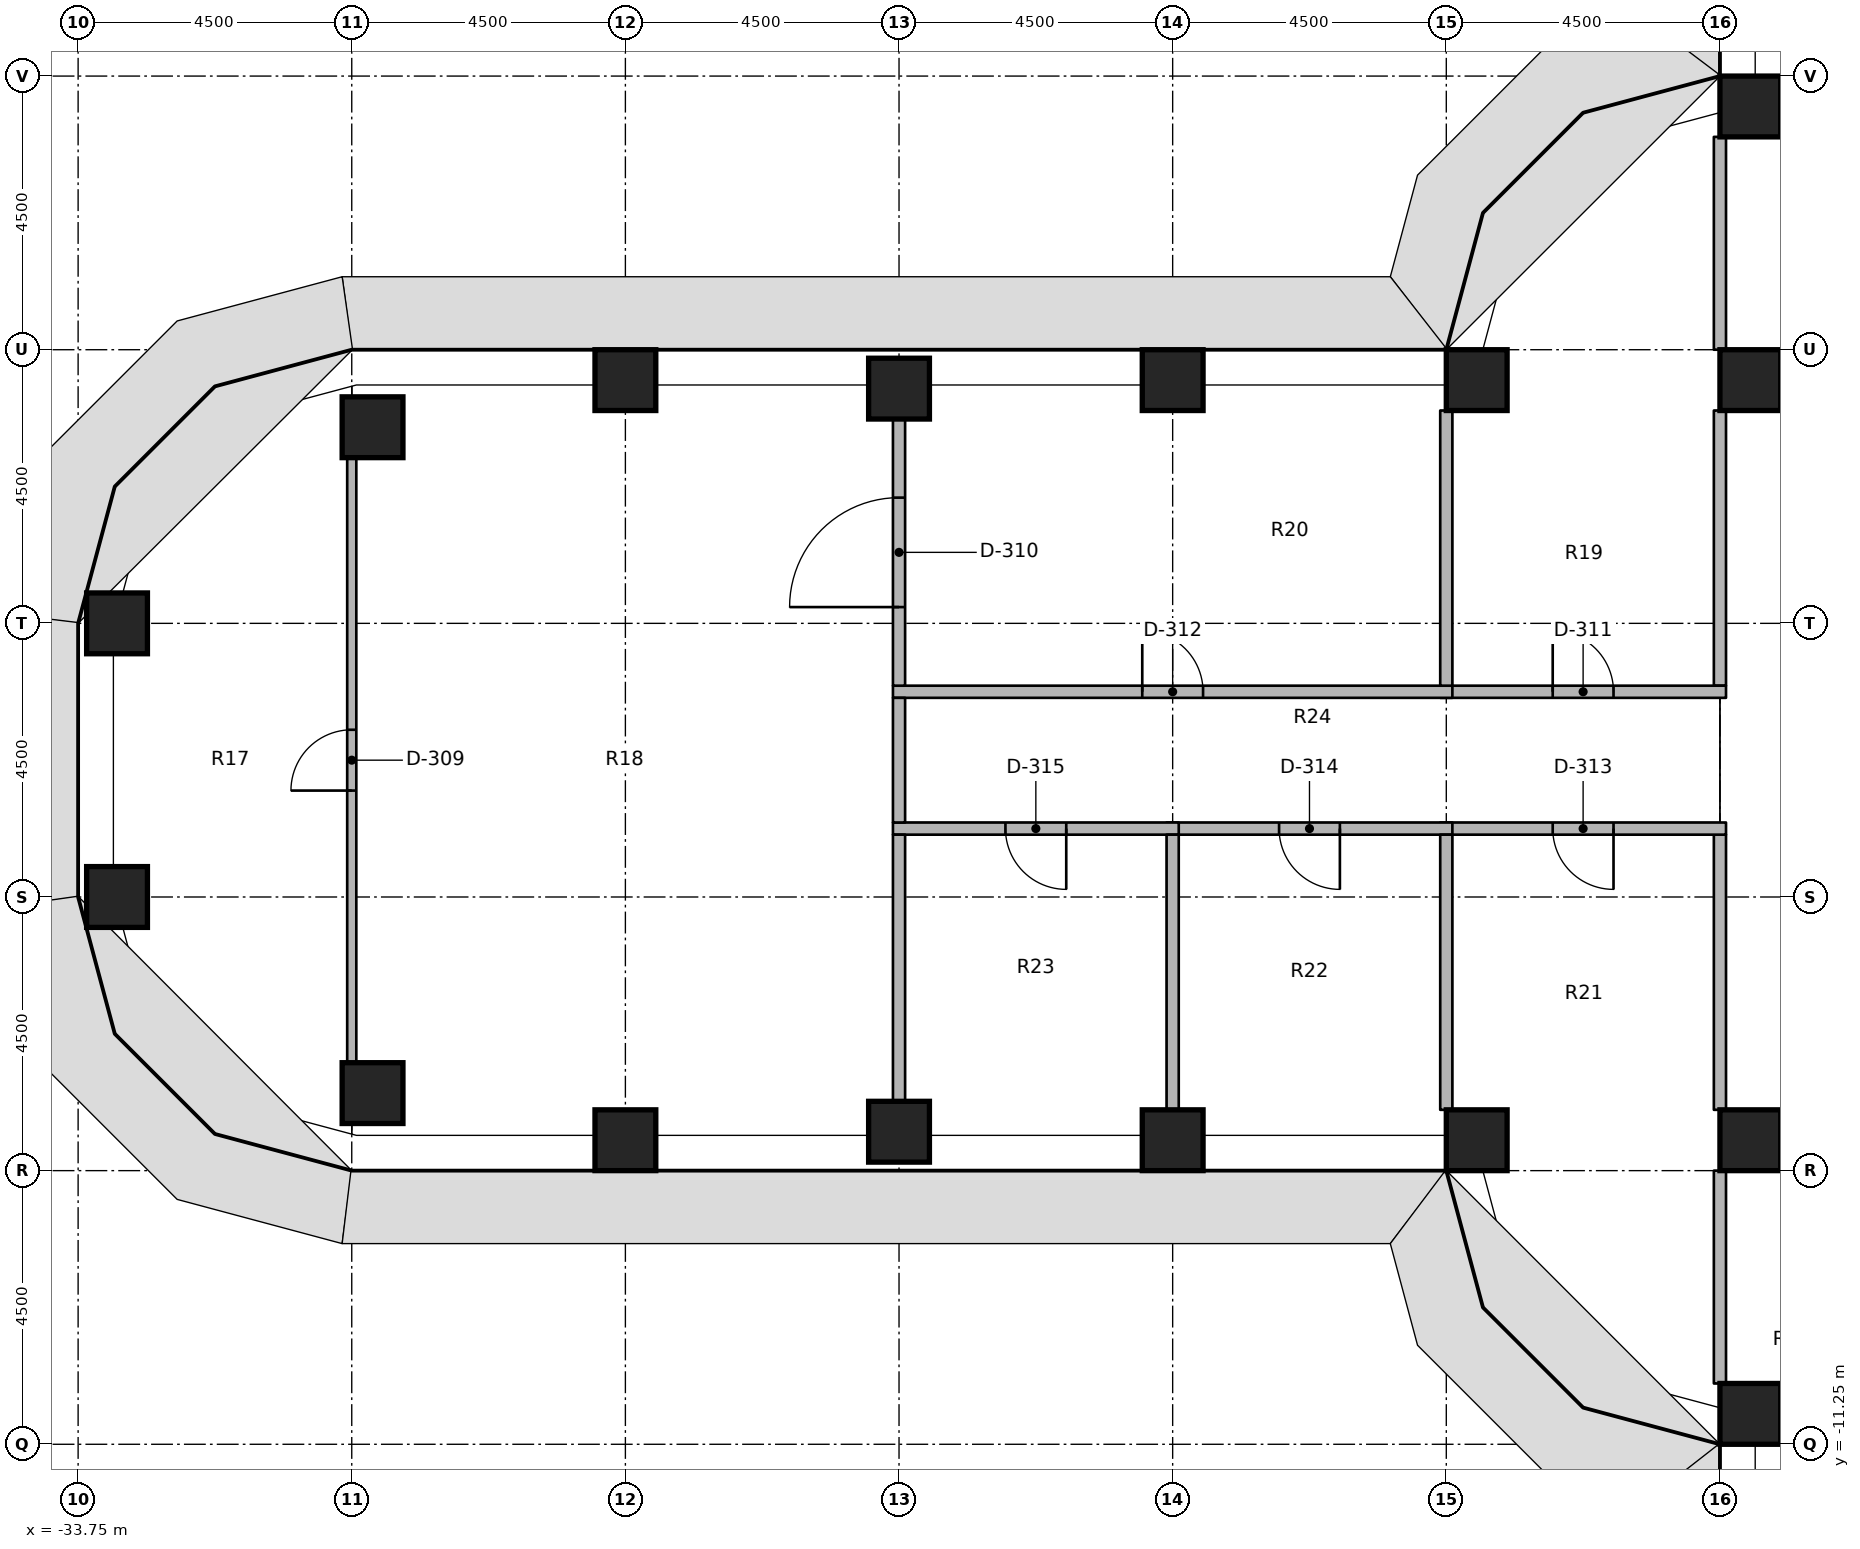
"""IFC4 building model, lengths in metres.
Left out: names, types, materials, properties, quantities, classifications, styles, units other than length and angle.
Written with IfcOpenShell. Run it as: python <this file> out.ifc"""

import sys

from ifc_helpers import new_model, si_unit, direction, frame, frame_2d, origin, origin_2d, place, context, subcontext, project, spatial, rectangle, extrude, element, fill, save


model = new_model("IFC4")
c1 = context("Model", 3, precision=1e-05, world=origin(), true_north=direction((0.0, 1.0)))
c2 = subcontext(c1, "Body", "Model", "MODEL_VIEW")
j1 = project(units=[si_unit("LENGTHUNIT", "METRE"), si_unit("PLANEANGLEUNIT", "RADIAN")], contexts=[c1])
p1 = place(None, origin())
s1 = spatial("IfcSite", under=j1, at=p1, CompositionType="ELEMENT")
p2 = place(p1, origin())
s2 = spatial("IfcBuilding", under=s1, at=p2, CompositionType="ELEMENT")
p3 = place(p2, frame((0.0, 0.0, 43.8)))
s3 = spatial("IfcBuildingStorey", under=s2, at=p3, CompositionType="ELEMENT", Elevation=43.8)
for number, where, z_axis, x_axis in (
    (1, (-33.11, -2.25, 0.0), (0.0, 0.0, 1.0), (1.0, 0.0, 0.0)),
    (2, (-33.11, 2.25, 0.0), (0.0, 0.0, 1.0), (1.0, 0.0, 0.0)),
    (3, (-28.908, -5.475, 0.0), (0.0, 0.0, 1.0), (1.0, 0.0, 0.0)),
    (4, (-28.908, 5.475, 0.0), (0.0, 0.0, 1.0), (1.0, 0.0, 0.0)),
    (5, (-24.75, -6.25, 0.0), (0.0, 0.0, 1.0), (1.0, 0.0, 0.0)),
    (6, (-24.75, 6.25, 0.0), (0.0, 0.0, 1.0), (1.0, 0.0, 0.0)),
    (7, (-20.25, -6.11, 0.0), (0.0, 0.0, 1.0), (1.0, 0.0, 0.0)),
    (8, (-20.25, 6.11, 0.0), (0.0, 0.0, 1.0), (1.0, 0.0, 0.0)),
    (9, (-15.75, -6.25, 0.0), (0.0, 0.0, 1.0), (1.0, 0.0, 0.0)),
    (10, (-15.75, 6.25, 0.0), (0.0, 0.0, 1.0), (1.0, 0.0, 0.0)),
    (11, (-10.75, -6.25, 0.0), (0.0, 0.0, 1.0), (1.0, 0.0, 0.0)),
    (12, (-10.75, 6.25, 0.0), (0.0, 0.0, 1.0), (1.0, 0.0, 0.0)),
    (13, (-6.25, -10.75, 0.0), (0.0, 0.0, 1.0), (1.0, 0.0, 0.0)),
    (14, (-6.25, -6.25, 0.0), (0.0, 0.0, 1.0), (1.0, 0.0, 0.0)),
    (15, (-6.25, 6.25, 0.0), (0.0, 0.0, 1.0), (1.0, 0.0, 0.0)),
    (16, (-6.25, 10.75, 0.0), (0.0, 0.0, 1.0), (1.0, 0.0, 0.0)),
):
    element("IfcColumn", number, at=place(p3, frame(where, z_axis=z_axis, x_axis=x_axis)), inside=s3, PredefinedType="COLUMN", context=c2, shape_type="SweptSolid", body=[
        extrude(rectangle(XDim=1.0, YDim=1.0, at=origin_2d()), origin(), (0.0, 0.0, 1.0), 4.05),
    ])
p4 = place(p3, frame((-6.75, 1.225, 0.0), z_axis=(0.0, 0.0, 1.0), x_axis=(0.0, 1.0, 0.0)))
e17 = element("IfcWall", 17, at=p4, inside=s3, PredefinedType="PARTITIONING", context=c2, shape_type="SweptSolid", body=[
    extrude(rectangle(XDim=4.525, YDim=0.2, at=frame_2d((2.262, 0.0))), origin(), (0.0, 0.0, 1.0), 3.13),
])
for number, where, z_axis, x_axis in (
    (18, (-6.75, 6.75, 0.0), (0.0, 0.0, 1.0), (0.0, 1.0, 0.0)),
    (19, (-6.75, -10.25, 0.0), (0.0, 0.0, 1.0), (0.0, 1.0, 0.0)),
):
    element("IfcWall", number, at=place(p3, frame(where, z_axis=z_axis, x_axis=x_axis)), inside=s3, PredefinedType="PARTITIONING", context=c2, shape_type="SweptSolid", body=[
        extrude(rectangle(XDim=3.5, YDim=0.2, at=frame_2d((1.75, 0.0))), origin(), (0.0, 0.0, 1.0), 3.13),
    ])
p5 = place(p3, frame((-6.75, -5.75, 0.0), z_axis=(0.0, 0.0, 1.0), x_axis=(0.0, 1.0, 0.0)))
e20 = element("IfcWall", 20, at=p5, inside=s3, PredefinedType="PARTITIONING", context=c2, shape_type="SweptSolid", body=[
    extrude(rectangle(XDim=4.525, YDim=0.2, at=frame_2d((2.262, 0.0))), origin(), (0.0, 0.0, 1.0), 3.13),
])
p6 = place(p3, frame((-11.35, 1.125, 0.0), z_axis=(0.0, 0.0, 1.0), x_axis=(1.0, 0.0, 0.0)))
e21 = element("IfcWall", 21, at=p6, inside=s3, PredefinedType="PARTITIONING", context=c2, shape_type="SweptSolid", body=[
    extrude(rectangle(XDim=4.7, YDim=0.2, at=frame_2d((2.35, 0.0))), origin(), (0.0, 0.0, 1.0), 3.13),
])
p7 = place(p6, frame((1.85, 0.0, 0.0)))
e22 = element("IfcOpeningElement", 22, at=p7, cuts=e21, PredefinedType="OPENING", context=c2, shape_type="SweptSolid", body=[
    extrude(rectangle(XDim=1.0, YDim=2.1, at=frame_2d((0.5, 1.05))), frame((0.0, 0.11, 0.0), z_axis=(0.0, -1.0, 0.0), x_axis=(1.0, 0.0, 0.0)), (0.0, 0.0, 1.0), 0.22),
])
p8 = place(p3, frame((-6.65, -1.125, 0.0), z_axis=(0.0, 0.0, 1.0), x_axis=(-1.0, 0.0, 0.0)))
e23 = element("IfcWall", 23, at=p8, inside=s3, PredefinedType="PARTITIONING", context=c2, shape_type="SweptSolid", body=[
    extrude(rectangle(XDim=4.7, YDim=0.2, at=frame_2d((2.35, 0.0))), origin(), (0.0, 0.0, 1.0), 3.13),
])
p9 = place(p8, frame((1.85, 0.0, 0.0)))
e24 = element("IfcOpeningElement", 24, at=p9, cuts=e23, PredefinedType="OPENING", context=c2, shape_type="SweptSolid", body=[
    extrude(rectangle(XDim=1.0, YDim=2.1, at=frame_2d((0.5, 1.05))), frame((0.0, 0.11, 0.0), z_axis=(0.0, -1.0, 0.0), x_axis=(1.0, 0.0, 0.0)), (0.0, 0.0, 1.0), 0.22),
])
p10 = place(p3, frame((-20.35, 1.125, 0.0), z_axis=(0.0, 0.0, 1.0), x_axis=(1.0, 0.0, 0.0)))
e25 = element("IfcWall", 25, at=p10, inside=s3, PredefinedType="PARTITIONING", context=c2, shape_type="SweptSolid", body=[
    extrude(rectangle(XDim=9.2, YDim=0.2, at=frame_2d((4.6, 0.0))), origin(), (0.0, 0.0, 1.0), 3.13),
])
p11 = place(p10, frame((4.1, 0.0, 0.0)))
e26 = element("IfcOpeningElement", 26, at=p11, cuts=e25, PredefinedType="OPENING", context=c2, shape_type="SweptSolid", body=[
    extrude(rectangle(XDim=1.0, YDim=2.1, at=frame_2d((0.5, 1.05))), frame((0.0, 0.11, 0.0), z_axis=(0.0, -1.0, 0.0), x_axis=(1.0, 0.0, 0.0)), (0.0, 0.0, 1.0), 0.22),
])
p12 = place(p3, frame((-11.15, -1.125, 0.0), z_axis=(0.0, 0.0, 1.0), x_axis=(-1.0, 0.0, 0.0)))
e27 = element("IfcWall", 27, at=p12, inside=s3, PredefinedType="PARTITIONING", context=c2, shape_type="SweptSolid", body=[
    extrude(rectangle(XDim=4.7, YDim=0.2, at=frame_2d((2.35, 0.0))), origin(), (0.0, 0.0, 1.0), 3.13),
])
p13 = place(p12, frame((1.85, 0.0, 0.0)))
e28 = element("IfcOpeningElement", 28, at=p13, cuts=e27, PredefinedType="OPENING", context=c2, shape_type="SweptSolid", body=[
    extrude(rectangle(XDim=1.0, YDim=2.1, at=frame_2d((0.5, 1.05))), frame((0.0, 0.11, 0.0), z_axis=(0.0, -1.0, 0.0), x_axis=(1.0, 0.0, 0.0)), (0.0, 0.0, 1.0), 0.22),
])
p14 = place(p3, frame((-15.65, -1.125, 0.0), z_axis=(0.0, 0.0, 1.0), x_axis=(-1.0, 0.0, 0.0)))
e29 = element("IfcWall", 29, at=p14, inside=s3, PredefinedType="PARTITIONING", context=c2, shape_type="SweptSolid", body=[
    extrude(rectangle(XDim=4.7, YDim=0.2, at=frame_2d((2.35, 0.0))), origin(), (0.0, 0.0, 1.0), 3.13),
])
p15 = place(p14, frame((1.85, 0.0, 0.0)))
e30 = element("IfcOpeningElement", 30, at=p15, cuts=e29, PredefinedType="OPENING", context=c2, shape_type="SweptSolid", body=[
    extrude(rectangle(XDim=1.0, YDim=2.1, at=frame_2d((0.5, 1.05))), frame((0.0, 0.11, 0.0), z_axis=(0.0, -1.0, 0.0), x_axis=(1.0, 0.0, 0.0)), (0.0, 0.0, 1.0), 0.22),
])
p16 = place(p3, frame((-20.25, -1.025, 0.0), z_axis=(0.0, 0.0, 1.0), x_axis=(0.0, 1.0, 0.0)))
e31 = element("IfcWall", 31, at=p16, inside=s3, PredefinedType="PARTITIONING", context=c2, shape_type="SweptSolid", body=[
    extrude(rectangle(XDim=2.05, YDim=0.2, at=frame_2d((1.025, 0.0))), origin(), (0.0, 0.0, 1.0), 3.13),
])
for number, where, z_axis, x_axis in (
    (32, (-11.25, 1.225, 0.0), (0.0, 0.0, 1.0), (0.0, 1.0, 0.0)),
    (33, (-11.25, -5.75, 0.0), (0.0, 0.0, 1.0), (0.0, 1.0, 0.0)),
):
    element("IfcWall", number, at=place(p3, frame(where, z_axis=z_axis, x_axis=x_axis)), inside=s3, PredefinedType="PARTITIONING", context=c2, shape_type="SweptSolid", body=[
        extrude(rectangle(XDim=4.525, YDim=0.2, at=frame_2d((2.262, 0.0))), origin(), (0.0, 0.0, 1.0), 3.13),
    ])
p17 = place(p3, frame((-20.25, 1.225, 0.0), z_axis=(0.0, 0.0, 1.0), x_axis=(0.0, 1.0, 0.0)))
e34 = element("IfcWall", 34, at=p17, inside=s3, PredefinedType="PARTITIONING", context=c2, shape_type="SweptSolid", body=[
    extrude(rectangle(XDim=4.385, YDim=0.2, at=frame_2d((2.192, 0.0))), origin(), (0.0, 0.0, 1.0), 3.13),
])
p18 = place(p17, frame((1.292, 0.0, 0.0)))
e35 = element("IfcOpeningElement", 35, at=p18, cuts=e34, PredefinedType="OPENING", context=c2, shape_type="SweptSolid", body=[
    extrude(rectangle(XDim=1.8, YDim=2.1, at=frame_2d((0.9, 1.05))), frame((0.0, 0.11, 0.0), z_axis=(0.0, -1.0, 0.0), x_axis=(1.0, 0.0, 0.0)), (0.0, 0.0, 1.0), 0.22),
])
p19 = place(p3, frame((-15.75, -5.75, 0.0), z_axis=(0.0, 0.0, 1.0), x_axis=(0.0, 1.0, 0.0)))
e36 = element("IfcWall", 36, at=p19, inside=s3, PredefinedType="PARTITIONING", context=c2, shape_type="SweptSolid", body=[
    extrude(rectangle(XDim=4.525, YDim=0.2, at=frame_2d((2.262, 0.0))), origin(), (0.0, 0.0, 1.0), 3.13),
])
p20 = place(p3, frame((-20.25, -5.61, 0.0), z_axis=(0.0, 0.0, 1.0), x_axis=(0.0, 1.0, 0.0)))
e37 = element("IfcWall", 37, at=p20, inside=s3, PredefinedType="PARTITIONING", context=c2, shape_type="SweptSolid", body=[
    extrude(rectangle(XDim=4.385, YDim=0.2, at=frame_2d((2.192, 0.0))), origin(), (0.0, 0.0, 1.0), 3.13),
])
p21 = place(p3, frame((-29.25, -4.975, 0.0), z_axis=(0.0, 0.0, 1.0), x_axis=(0.0, 1.0, 0.0)))
e38 = element("IfcWall", 38, at=p21, inside=s3, PredefinedType="PARTITIONING", context=c2, shape_type="SweptSolid", body=[
    extrude(rectangle(XDim=9.95, YDim=0.15, at=frame_2d((4.975, 0.0))), origin(), (0.0, 0.0, 1.0), 3.13),
])
p22 = place(p21, frame((4.475, 0.0, 0.0)))
e39 = element("IfcOpeningElement", 39, at=p22, cuts=e38, PredefinedType="OPENING", context=c2, shape_type="SweptSolid", body=[
    extrude(rectangle(XDim=1.0, YDim=2.1, at=frame_2d((0.5, 1.05))), frame((0.0, 0.085, 0.0), z_axis=(0.0, -1.0, 0.0), x_axis=(1.0, 0.0, 0.0)), (0.0, 0.0, 1.0), 0.17),
])
p23 = place(p22, origin())
e40 = element("IfcDoor", 40, at=p23, inside=s3, OperationType="SINGLE_SWING_RIGHT", PredefinedType="DOOR", context=c2, shape_type="SweptSolid", body=[
    extrude(rectangle(XDim=1.0, YDim=2.1, at=frame_2d((0.5, 1.05))), frame((0.0, 0.025, 0.0), z_axis=(0.0, -1.0, 0.0), x_axis=(1.0, 0.0, 0.0)), (0.0, 0.0, 1.0), 0.05),
])
fill(e39, e40)
p24 = place(p18, origin())
e41 = element("IfcDoor", 41, at=p24, inside=s3, OperationType="DOUBLE_DOOR_SINGLE_SWING", PredefinedType="DOOR", context=c2, shape_type="SweptSolid", body=[
    extrude(rectangle(XDim=1.8, YDim=2.1, at=frame_2d((0.9, 1.05))), frame((0.0, 0.025, 0.0), z_axis=(0.0, -1.0, 0.0), x_axis=(1.0, 0.0, 0.0)), (0.0, 0.0, 1.0), 0.05),
])
fill(e35, e41)
p25 = place(p7, origin())
e42 = element("IfcDoor", 42, at=p25, inside=s3, OperationType="SINGLE_SWING_RIGHT", PredefinedType="DOOR", context=c2, shape_type="SweptSolid", body=[
    extrude(rectangle(XDim=1.0, YDim=2.1, at=frame_2d((0.5, 1.05))), frame((0.0, 0.025, 0.0), z_axis=(0.0, -1.0, 0.0), x_axis=(1.0, 0.0, 0.0)), (0.0, 0.0, 1.0), 0.05),
])
fill(e22, e42)
p26 = place(p11, origin())
e43 = element("IfcDoor", 43, at=p26, inside=s3, OperationType="SINGLE_SWING_RIGHT", PredefinedType="DOOR", context=c2, shape_type="SweptSolid", body=[
    extrude(rectangle(XDim=1.0, YDim=2.1, at=frame_2d((0.5, 1.05))), frame((0.0, 0.025, 0.0), z_axis=(0.0, -1.0, 0.0), x_axis=(1.0, 0.0, 0.0)), (0.0, 0.0, 1.0), 0.05),
])
fill(e26, e43)
p27 = place(p9, origin())
e44 = element("IfcDoor", 44, at=p27, inside=s3, OperationType="SINGLE_SWING_RIGHT", PredefinedType="DOOR", context=c2, shape_type="SweptSolid", body=[
    extrude(rectangle(XDim=1.0, YDim=2.1, at=frame_2d((0.5, 1.05))), frame((0.0, 0.025, 0.0), z_axis=(0.0, -1.0, 0.0), x_axis=(1.0, 0.0, 0.0)), (0.0, 0.0, 1.0), 0.05),
])
fill(e24, e44)
p28 = place(p13, origin())
e45 = element("IfcDoor", 45, at=p28, inside=s3, OperationType="SINGLE_SWING_RIGHT", PredefinedType="DOOR", context=c2, shape_type="SweptSolid", body=[
    extrude(rectangle(XDim=1.0, YDim=2.1, at=frame_2d((0.5, 1.05))), frame((0.0, 0.025, 0.0), z_axis=(0.0, -1.0, 0.0), x_axis=(1.0, 0.0, 0.0)), (0.0, 0.0, 1.0), 0.05),
])
fill(e28, e45)
p29 = place(p15, origin())
e46 = element("IfcDoor", 46, at=p29, inside=s3, OperationType="SINGLE_SWING_LEFT", PredefinedType="DOOR", context=c2, shape_type="SweptSolid", body=[
    extrude(rectangle(XDim=1.0, YDim=2.1, at=frame_2d((0.5, 1.05))), frame((0.0, 0.025, 0.0), z_axis=(0.0, -1.0, 0.0), x_axis=(1.0, 0.0, 0.0)), (0.0, 0.0, 1.0), 0.05),
])
fill(e30, e46)
save(model, sys.argv[1])
